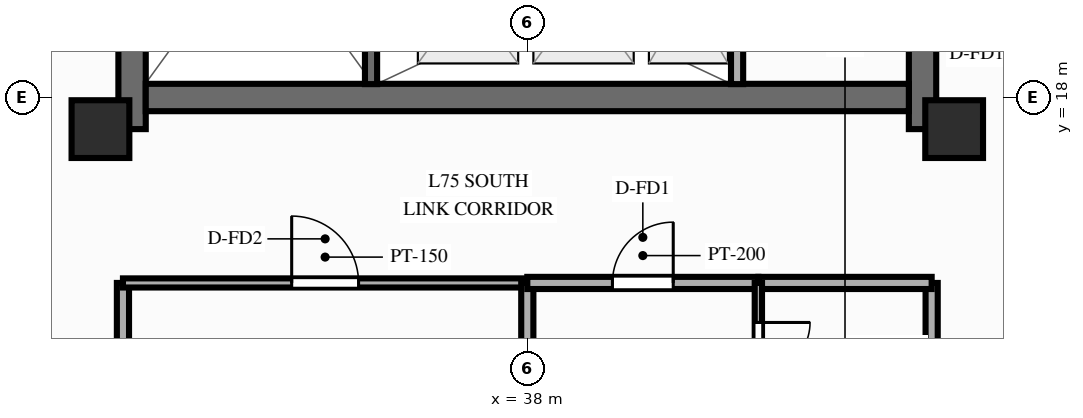
"""IFC4 building model, lengths in metres.
Left out: names, types, materials, properties, quantities, classifications, styles, units other than length and angle.
Written with IfcOpenShell. Run it as: python <this file> out.ifc"""

import sys

from ifc_helpers import new_model, si_unit, direction, frame, frame_2d, origin, origin_2d, place, context, subcontext, project, spatial, rectangle, extrude, source, transform, mapped, element, fill, save


model = new_model("IFC4")
c1 = context("Model", 3, precision=1e-05, world=origin(), true_north=direction((0.0, 1.0)))
c2 = subcontext(c1, "Body", "Model", "MODEL_VIEW")
j1 = project(units=[si_unit("LENGTHUNIT", "METRE"), si_unit("PLANEANGLEUNIT", "RADIAN")], contexts=[c1])
p1 = place(None, origin())
s1 = spatial("IfcSite", under=j1, at=p1, CompositionType="ELEMENT")
p2 = place(p1, origin())
s2 = spatial("IfcBuilding", under=s1, at=p2, CompositionType="ELEMENT")
p3 = place(p2, frame((0.0, 0.0, 243.0)))
s3 = spatial("IfcBuildingStorey", under=s2, at=p3, CompositionType="ELEMENT", Elevation=243.0)
p4 = place(p3, frame((31.5, 17.48, 0.0), z_axis=(0.0, 0.0, 1.0), x_axis=(0.0, 1.0, 0.0)))
e1 = element("IfcWall", 1, at=p4, inside=s3, PredefinedType="SHEAR", context=c2, shape_type="SweptSolid", body=[
    extrude(rectangle(XDim=19.04, YDim=0.45, at=frame_2d((9.52, 0.0))), origin(), (0.0, 0.0, 1.0), 3.0),
])
p5 = place(p4, frame((6.32, 0.0, 0.0)))
e2 = element("IfcOpeningElement", 2, at=p5, cuts=e1, PredefinedType="OPENING", context=c2, shape_type="SweptSolid", body=[
    extrude(rectangle(XDim=1.1, YDim=2.15, at=frame_2d((0.55, 1.075))), frame((0.0, 0.237, 0.0), z_axis=(0.0, -1.0, 0.0), x_axis=(1.0, 0.0, 0.0)), (0.0, 0.0, 1.0), 0.474),
])
p6 = place(p3, frame((44.5, 17.48, 0.0), z_axis=(0.0, 0.0, 1.0), x_axis=(0.0, 1.0, 0.0)))
e3 = element("IfcWall", 3, at=p6, inside=s3, PredefinedType="SHEAR", context=c2, shape_type="SweptSolid", body=[
    extrude(rectangle(XDim=19.04, YDim=0.45, at=frame_2d((9.52, 0.0))), origin(), (0.0, 0.0, 1.0), 3.0),
])
p7 = place(p6, frame((12.67, 0.0, 0.0), z_axis=(0.0, 0.0, 1.0), x_axis=(-1.0, 0.0, 0.0)))
e4 = element("IfcOpeningElement", 4, at=p7, cuts=e3, PredefinedType="OPENING", context=c2, shape_type="SweptSolid", body=[
    extrude(rectangle(XDim=1.1, YDim=2.15, at=frame_2d((0.55, 1.075))), frame((0.0, 0.237, 0.0), z_axis=(0.0, -1.0, 0.0), x_axis=(1.0, 0.0, 0.0)), (0.0, 0.0, 1.0), 0.474),
])
p8 = place(p3, frame((31.725, 18.0, 0.0), z_axis=(0.0, 0.0, 1.0), x_axis=(1.0, 0.0, 0.0)))
e5 = element("IfcWall", 5, at=p8, inside=s3, PredefinedType="SHEAR", context=c2, shape_type="SweptSolid", body=[
    extrude(rectangle(XDim=12.55, YDim=0.45, at=frame_2d((6.275, 0.0))), origin(), (0.0, 0.0, 1.0), 3.0),
])
m1 = source(origin(), c2, "Body", "SweptSolid", [
    extrude(rectangle(XDim=0.95, YDim=0.95, at=origin_2d()), origin(), (0.0, 0.0, 1.0), 3.0),
])
for number, where, z_axis, x_axis in (
    (6, (30.98, 17.48, 0.0), (0.0, 0.0, 1.0), (1.0, 0.0, 0.0)),
    (7, (45.02, 17.48, 0.0), (0.0, 0.0, 1.0), (1.0, 0.0, 0.0)),
):
    element("IfcColumn", number, at=place(p3, frame(where, z_axis=z_axis, x_axis=x_axis)), inside=s3, PredefinedType="COLUMN", context=c2, shape_type="MappedRepresentation", body=[
        mapped(m1, transform((0.0, 0.0, 0.0), scale=1.0)),
    ])
p9 = place(p3, frame((41.45, 18.22, 0.0), z_axis=(0.0, 0.0, 1.0), x_axis=(0.0, 1.0, 0.0)))
e8 = element("IfcWall", 8, at=p9, inside=s3, PredefinedType="PARTITIONING", context=c2, shape_type="SweptSolid", body=[
    extrude(rectangle(XDim=2.86, YDim=0.2, at=frame_2d((1.43, 0.0))), origin(), (0.0, 0.0, 1.0), 2.79),
])
p10 = place(p3, frame((35.43, 18.22, 0.0), z_axis=(0.0, 0.0, 1.0), x_axis=(0.0, 1.0, 0.0)))
e9 = element("IfcWall", 9, at=p10, inside=s3, PredefinedType="SOLIDWALL", context=c2, shape_type="SweptSolid", body=[
    extrude(rectangle(XDim=7.22, YDim=0.2, at=frame_2d((3.61, 0.0))), origin(), (0.0, 0.0, 1.0), 2.79),
])
p11 = place(p10, frame((6.68, 0.0, 0.0), z_axis=(0.0, 0.0, 1.0), x_axis=(-1.0, 0.0, 0.0)))
e10 = element("IfcOpeningElement", 10, at=p11, cuts=e9, PredefinedType="OPENING", context=c2, shape_type="SweptSolid", body=[
    extrude(rectangle(XDim=1.1, YDim=2.15, at=frame_2d((0.55, 1.075))), frame((0.0, 0.112, 0.0), z_axis=(0.0, -1.0, 0.0), x_axis=(1.0, 0.0, 0.0)), (0.0, 0.0, 1.0), 0.224),
])
for number, where, z_axis, x_axis in (
    (11, (31.35, 14.95, 0.0), (0.0, 0.0, 1.0), (0.0, -1.0, 0.0)),
    (12, (44.65, 14.95, 0.0), (0.0, 0.0, 1.0), (0.0, -1.0, 0.0)),
):
    element("IfcWall", number, at=place(p3, frame(where, z_axis=z_axis, x_axis=x_axis)), inside=s3, PredefinedType="PARTITIONING", context=c2, shape_type="SweptSolid", body=[
        extrude(rectangle(XDim=8.8, YDim=0.2, at=frame_2d((4.4, 0.0))), origin(), (0.0, 0.0, 1.0), 2.39),
    ])
p12 = place(p3, frame((31.35, 14.95, 0.0), z_axis=(0.0, 0.0, 1.0), x_axis=(1.0, 0.0, 0.0)))
e13 = element("IfcWall", 13, at=p12, inside=s3, PredefinedType="PARTITIONING", context=c2, shape_type="SweptSolid", body=[
    extrude(rectangle(XDim=6.65, YDim=0.15, at=frame_2d((3.325, 0.0))), origin(), (0.0, 0.0, 1.0), 2.79),
])
p13 = place(p12, frame((2.775, 0.0, 0.0)))
e14 = element("IfcOpeningElement", 14, at=p13, cuts=e13, PredefinedType="OPENING", context=c2, shape_type="SweptSolid", body=[
    extrude(rectangle(XDim=1.1, YDim=2.15, at=frame_2d((0.55, 1.075))), frame((0.0, 0.087, 0.0), z_axis=(0.0, -1.0, 0.0), x_axis=(1.0, 0.0, 0.0)), (0.0, 0.0, 1.0), 0.174),
])
p14 = place(p3, frame((38.0, 14.95, 0.0), z_axis=(0.0, 0.0, 1.0), x_axis=(0.0, -1.0, 0.0)))
e15 = element("IfcWall", 15, at=p14, inside=s3, PredefinedType="PARTITIONING", context=c2, shape_type="SweptSolid", body=[
    extrude(rectangle(XDim=8.8, YDim=0.2, at=frame_2d((4.4, 0.0))), origin(), (0.0, 0.0, 1.0), 2.79),
])
p15 = place(p3, frame((38.0, 14.95, 0.0), z_axis=(0.0, 0.0, 1.0), x_axis=(1.0, 0.0, 0.0)))
e16 = element("IfcWall", 16, at=p15, inside=s3, PredefinedType="PARTITIONING", context=c2, shape_type="SweptSolid", body=[
    extrude(rectangle(XDim=3.8, YDim=0.2, at=frame_2d((1.9, 0.0))), origin(), (0.0, 0.0, 1.0), 2.79),
])
p16 = place(p15, frame((1.4, 0.0, 0.0)))
e17 = element("IfcOpeningElement", 17, at=p16, cuts=e16, PredefinedType="OPENING", context=c2, shape_type="SweptSolid", body=[
    extrude(rectangle(XDim=1.0, YDim=2.15, at=frame_2d((0.5, 1.075))), frame((0.0, 0.112, 0.0), z_axis=(0.0, -1.0, 0.0), x_axis=(1.0, 0.0, 0.0)), (0.0, 0.0, 1.0), 0.224),
])
p17 = place(p3, frame((41.8, 14.95, 0.0), z_axis=(0.0, 0.0, 1.0), x_axis=(1.0, 0.0, 0.0)))
e18 = element("IfcWall", 18, at=p17, inside=s3, PredefinedType="PARTITIONING", context=c2, shape_type="SweptSolid", body=[
    extrude(rectangle(XDim=2.85, YDim=0.2, at=frame_2d((1.425, 0.0))), origin(), (0.0, 0.0, 1.0), 2.79),
])
p18 = place(p3, frame((41.8, 14.95, 0.0), z_axis=(0.0, 0.0, 1.0), x_axis=(0.0, -1.0, 0.0)))
e19 = element("IfcWall", 19, at=p18, inside=s3, PredefinedType="PARTITIONING", context=c2, shape_type="SweptSolid", body=[
    extrude(rectangle(XDim=2.15, YDim=0.12, at=frame_2d((1.075, 0.0))), origin(), (0.0, 0.0, 1.0), 2.79),
])
p19 = place(p18, frame((0.65, 0.0, 0.0)))
e20 = element("IfcOpeningElement", 20, at=p19, cuts=e19, PredefinedType="OPENING", context=c2, shape_type="SweptSolid", body=[
    extrude(rectangle(XDim=0.85, YDim=2.05, at=frame_2d((0.425, 1.025))), frame((0.0, 0.072, 0.0), z_axis=(0.0, -1.0, 0.0), x_axis=(1.0, 0.0, 0.0)), (0.0, 0.0, 1.0), 0.144),
])
m2 = source(origin(), c2, "Body", "SweptSolid", [
    extrude(rectangle(XDim=1.1, YDim=2.15, at=frame_2d((0.55, 1.075))), frame((0.0, 0.025, 0.0), z_axis=(0.0, -1.0, 0.0), x_axis=(1.0, 0.0, 0.0)), (0.0, 0.0, 1.0), 0.05),
])
p20 = place(p13, origin())
e21 = element("IfcDoor", 21, at=p20, inside=s3, OperationType="SINGLE_SWING_LEFT", PredefinedType="DOOR", context=c2, shape_type="MappedRepresentation", body=[
    mapped(m2, transform((0.0, 0.0, 0.0), scale=1.0)),
])
fill(e14, e21)
m3 = source(origin(), c2, "Body", "SweptSolid", [
    extrude(rectangle(XDim=1.0, YDim=2.15, at=frame_2d((0.5, 1.075))), frame((0.0, 0.025, 0.0), z_axis=(0.0, -1.0, 0.0), x_axis=(1.0, 0.0, 0.0)), (0.0, 0.0, 1.0), 0.05),
])
p21 = place(p16, origin())
e22 = element("IfcDoor", 22, at=p21, inside=s3, OperationType="SINGLE_SWING_RIGHT", PredefinedType="DOOR", context=c2, shape_type="MappedRepresentation", body=[
    mapped(m3, transform((0.0, 0.0, 0.0), scale=1.0)),
])
fill(e17, e22)
m4 = source(origin(), c2, "Body", "SweptSolid", [
    extrude(rectangle(XDim=0.85, YDim=2.05, at=frame_2d((0.425, 1.025))), frame((0.0, 0.025, 0.0), z_axis=(0.0, -1.0, 0.0), x_axis=(1.0, 0.0, 0.0)), (0.0, 0.0, 1.0), 0.05),
])
p22 = place(p19, origin())
e23 = element("IfcDoor", 23, at=p22, inside=s3, OperationType="SINGLE_SWING_LEFT", PredefinedType="DOOR", context=c2, shape_type="MappedRepresentation", body=[
    mapped(m4, transform((0.0, 0.0, 0.0), scale=1.0)),
])
fill(e20, e23)
save(model, sys.argv[1])
